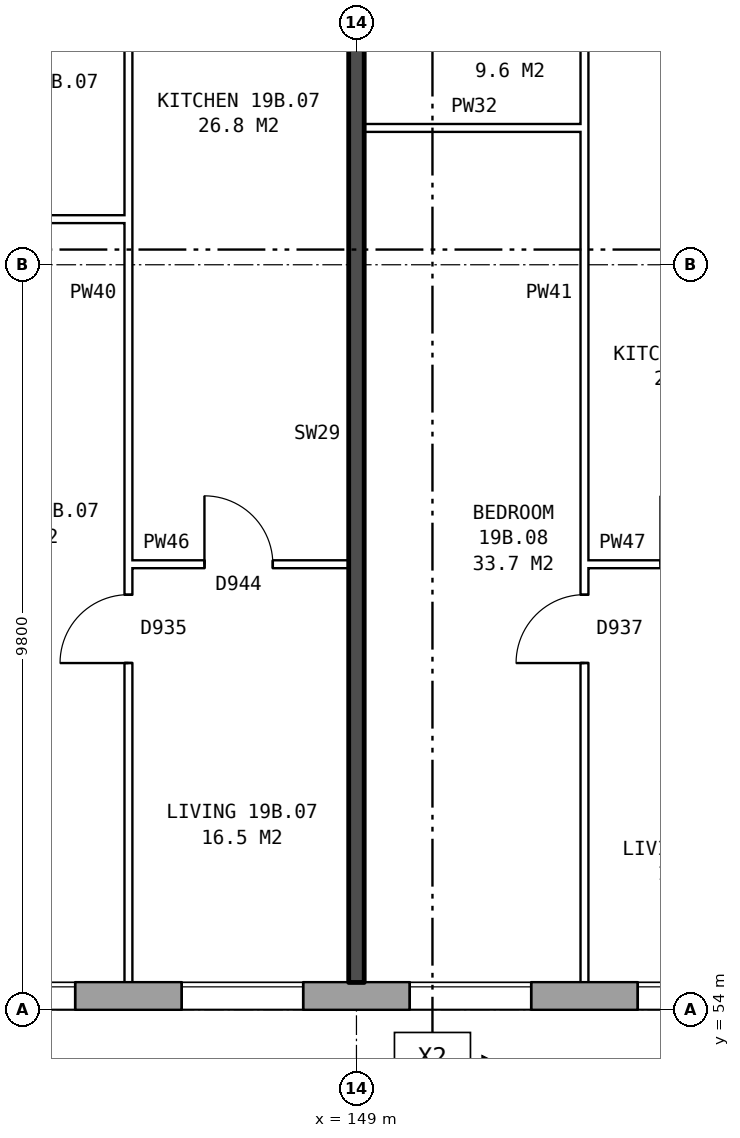
"""IFC4 building model, lengths in metres.
Left out: names, types, materials, properties, quantities, classifications, styles, units other than length and angle.
Written with IfcOpenShell. Run it as: python <this file> out.ifc"""

import sys

from ifc_helpers import new_model, si_unit, direction, frame, frame_2d, origin, place, context, subcontext, project, spatial, rectangle, extrude, element, fill, save


model = new_model("IFC4")
c1 = context("Model", 3, precision=1e-05, world=origin(), true_north=direction((0.0, 1.0)))
c2 = subcontext(c1, "Body", "Model", "MODEL_VIEW")
j1 = project(units=[si_unit("LENGTHUNIT", "METRE"), si_unit("PLANEANGLEUNIT", "RADIAN")], contexts=[c1])
p1 = place(None, origin())
s1 = spatial("IfcSite", under=j1, at=p1, CompositionType="ELEMENT")
p2 = place(p1, origin())
s2 = spatial("IfcBuilding", under=s1, at=p2, CompositionType="ELEMENT")
p3 = place(p2, frame((0.0, 0.0, 71.6)))
s3 = spatial("IfcBuildingStorey", under=s2, at=p3, CompositionType="ELEMENT", Elevation=71.6)
p4 = place(p3, frame((134.075, 54.18, 0.0), z_axis=(0.0, 0.0, 1.0), x_axis=(1.0, 0.0, 0.0)))
e1 = element("IfcWall", 1, at=p4, inside=s3, PredefinedType="STANDARD", context=c2, shape_type="SweptSolid", body=[
    extrude(rectangle(XDim=38.101, YDim=0.36, at=frame_2d((19.05, 0.0))), origin(), (0.0, 0.0, 1.0), 2.85),
])
p5 = place(p4, frame((0.3, 0.0, 0.8)))
e2 = element("IfcOpeningElement", 2, at=p5, cuts=e1, PredefinedType="OPENING", context=c2, shape_type="SweptSolid", body=[
    extrude(rectangle(XDim=1.0, YDim=1.8, at=frame_2d((0.5, 0.9))), frame((0.0, 0.19, 0.0), z_axis=(0.0, -1.0, 0.0), x_axis=(1.0, 0.0, 0.0)), (0.0, 0.0, 1.0), 0.38),
])
p6 = place(p4, frame((3.525, 0.0, 0.8)))
e3 = element("IfcOpeningElement", 3, at=p6, cuts=e1, PredefinedType="OPENING", context=c2, shape_type="SweptSolid", body=[
    extrude(rectangle(XDim=0.8, YDim=0.9, at=frame_2d((0.4, 0.45))), frame((0.0, 0.19, 0.0), z_axis=(0.0, -1.0, 0.0), x_axis=(1.0, 0.0, 0.0)), (0.0, 0.0, 1.0), 0.38),
])
p7 = place(p4, frame((6.625, 0.0, 0.8)))
e4 = element("IfcOpeningElement", 4, at=p7, cuts=e1, PredefinedType="OPENING", context=c2, shape_type="SweptSolid", body=[
    extrude(rectangle(XDim=1.6, YDim=1.8, at=frame_2d((0.8, 0.9))), frame((0.0, 0.19, 0.0), z_axis=(0.0, -1.0, 0.0), x_axis=(1.0, 0.0, 0.0)), (0.0, 0.0, 1.0), 0.38),
])
p8 = place(p4, frame((9.625, 0.0, 0.8)))
e5 = element("IfcOpeningElement", 5, at=p8, cuts=e1, PredefinedType="OPENING", context=c2, shape_type="SweptSolid", body=[
    extrude(rectangle(XDim=1.6, YDim=1.8, at=frame_2d((0.8, 0.9))), frame((0.0, 0.19, 0.0), z_axis=(0.0, -1.0, 0.0), x_axis=(1.0, 0.0, 0.0)), (0.0, 0.0, 1.0), 0.38),
])
p9 = place(p4, frame((12.625, 0.0, 0.8)))
e6 = element("IfcOpeningElement", 6, at=p9, cuts=e1, PredefinedType="OPENING", context=c2, shape_type="SweptSolid", body=[
    extrude(rectangle(XDim=1.6, YDim=1.8, at=frame_2d((0.8, 0.9))), frame((0.0, 0.19, 0.0), z_axis=(0.0, -1.0, 0.0), x_axis=(1.0, 0.0, 0.0)), (0.0, 0.0, 1.0), 0.38),
])
p10 = place(p4, frame((15.625, 0.0, 0.8)))
e7 = element("IfcOpeningElement", 7, at=p10, cuts=e1, PredefinedType="OPENING", context=c2, shape_type="SweptSolid", body=[
    extrude(rectangle(XDim=1.6, YDim=1.8, at=frame_2d((0.8, 0.9))), frame((0.0, 0.19, 0.0), z_axis=(0.0, -1.0, 0.0), x_axis=(1.0, 0.0, 0.0)), (0.0, 0.0, 1.0), 0.38),
])
p11 = place(p4, frame((18.625, 0.0, 0.8)))
e8 = element("IfcOpeningElement", 8, at=p11, cuts=e1, PredefinedType="OPENING", context=c2, shape_type="SweptSolid", body=[
    extrude(rectangle(XDim=1.6, YDim=1.8, at=frame_2d((0.8, 0.9))), frame((0.0, 0.19, 0.0), z_axis=(0.0, -1.0, 0.0), x_axis=(1.0, 0.0, 0.0)), (0.0, 0.0, 1.0), 0.38),
])
p12 = place(p4, frame((21.625, 0.0, 0.8)))
e9 = element("IfcOpeningElement", 9, at=p12, cuts=e1, PredefinedType="OPENING", context=c2, shape_type="SweptSolid", body=[
    extrude(rectangle(XDim=1.6, YDim=1.8, at=frame_2d((0.8, 0.9))), frame((0.0, 0.19, 0.0), z_axis=(0.0, -1.0, 0.0), x_axis=(1.0, 0.0, 0.0)), (0.0, 0.0, 1.0), 0.38),
])
p13 = place(p4, frame((24.625, 0.0, 0.8)))
e10 = element("IfcOpeningElement", 10, at=p13, cuts=e1, PredefinedType="OPENING", context=c2, shape_type="SweptSolid", body=[
    extrude(rectangle(XDim=1.6, YDim=1.8, at=frame_2d((0.8, 0.9))), frame((0.0, 0.19, 0.0), z_axis=(0.0, -1.0, 0.0), x_axis=(1.0, 0.0, 0.0)), (0.0, 0.0, 1.0), 0.38),
])
p14 = place(p4, frame((27.625, 0.0, 0.8)))
e11 = element("IfcOpeningElement", 11, at=p14, cuts=e1, PredefinedType="OPENING", context=c2, shape_type="SweptSolid", body=[
    extrude(rectangle(XDim=1.6, YDim=1.8, at=frame_2d((0.8, 0.9))), frame((0.0, 0.19, 0.0), z_axis=(0.0, -1.0, 0.0), x_axis=(1.0, 0.0, 0.0)), (0.0, 0.0, 1.0), 0.38),
])
p15 = place(p4, frame((30.625, 0.0, 0.8)))
e12 = element("IfcOpeningElement", 12, at=p15, cuts=e1, PredefinedType="OPENING", context=c2, shape_type="SweptSolid", body=[
    extrude(rectangle(XDim=1.6, YDim=1.8, at=frame_2d((0.8, 0.9))), frame((0.0, 0.19, 0.0), z_axis=(0.0, -1.0, 0.0), x_axis=(1.0, 0.0, 0.0)), (0.0, 0.0, 1.0), 0.38),
])
p16 = place(p4, frame((33.125, 0.0, 0.8)))
e13 = element("IfcOpeningElement", 13, at=p16, cuts=e1, PredefinedType="OPENING", context=c2, shape_type="SweptSolid", body=[
    extrude(rectangle(XDim=1.4, YDim=0.9, at=frame_2d((0.7, 0.45))), frame((0.0, 0.19, 0.0), z_axis=(0.0, -1.0, 0.0), x_axis=(1.0, 0.0, 0.0)), (0.0, 0.0, 1.0), 0.38),
])
p17 = place(p4, frame((1.6, 0.0, 1.6)))
e14 = element("IfcOpeningElement", 14, at=p17, cuts=e1, PredefinedType="OPENING", context=c2, shape_type="SweptSolid", body=[
    extrude(rectangle(XDim=0.6, YDim=0.9, at=frame_2d((0.3, 0.45))), frame((0.0, 0.19, 0.0), z_axis=(0.0, -1.0, 0.0), x_axis=(1.0, 0.0, 0.0)), (0.0, 0.0, 1.0), 0.38),
])
p18 = place(p4, frame((4.625, 0.0, 0.8)))
e15 = element("IfcOpeningElement", 15, at=p18, cuts=e1, PredefinedType="OPENING", context=c2, shape_type="SweptSolid", body=[
    extrude(rectangle(XDim=1.6, YDim=1.8, at=frame_2d((0.8, 0.9))), frame((0.0, 0.19, 0.0), z_axis=(0.0, -1.0, 0.0), x_axis=(1.0, 0.0, 0.0)), (0.0, 0.0, 1.0), 0.38),
])
p19 = place(p4, frame((35.775, 0.0, 1.7)))
e16 = element("IfcOpeningElement", 16, at=p19, cuts=e1, PredefinedType="OPENING", context=c2, shape_type="SweptSolid", body=[
    extrude(rectangle(XDim=0.6, YDim=0.9, at=frame_2d((0.3, 0.45))), frame((0.0, 0.19, 0.0), z_axis=(0.0, -1.0, 0.0), x_axis=(1.0, 0.0, 0.0)), (0.0, 0.0, 1.0), 0.38),
])
p20 = place(p4, frame((36.675, 0.0, 0.8)))
e17 = element("IfcOpeningElement", 17, at=p20, cuts=e1, PredefinedType="OPENING", context=c2, shape_type="SweptSolid", body=[
    extrude(rectangle(XDim=1.0, YDim=1.8, at=frame_2d((0.5, 0.9))), frame((0.0, 0.19, 0.0), z_axis=(0.0, -1.0, 0.0), x_axis=(1.0, 0.0, 0.0)), (0.0, 0.0, 1.0), 0.38),
])
p21 = place(p3, frame((146.0, 59.86, 0.0), z_axis=(0.0, 0.0, 1.0), x_axis=(1.0, 0.0, 0.0)))
e18 = element("IfcWall", 18, at=p21, inside=s3, PredefinedType="PARTITIONING", context=c2, shape_type="SweptSolid", body=[
    extrude(rectangle(XDim=2.9, YDim=0.1, at=frame_2d((1.45, 0.0))), origin(), (0.0, 0.0, 1.0), 2.85),
])
p22 = place(p21, frame((1.0, 0.0, 0.0)))
e19 = element("IfcOpeningElement", 19, at=p22, cuts=e18, PredefinedType="OPENING", context=c2, shape_type="SweptSolid", body=[
    extrude(rectangle(XDim=0.9, YDim=2.1, at=frame_2d((0.45, 1.05))), frame((0.0, 0.06, 0.0), z_axis=(0.0, -1.0, 0.0), x_axis=(1.0, 0.0, 0.0)), (0.0, 0.0, 1.0), 0.12),
])
p23 = place(p3, frame((152.0, 59.86, 0.0), z_axis=(0.0, 0.0, 1.0), x_axis=(1.0, 0.0, 0.0)))
e20 = element("IfcWall", 20, at=p23, inside=s3, PredefinedType="PARTITIONING", context=c2, shape_type="SweptSolid", body=[
    extrude(rectangle(XDim=2.9, YDim=0.1, at=frame_2d((1.45, 0.0))), origin(), (0.0, 0.0, 1.0), 2.85),
])
p24 = place(p23, frame((1.0, 0.0, 0.0)))
e21 = element("IfcOpeningElement", 21, at=p24, cuts=e20, PredefinedType="OPENING", context=c2, shape_type="SweptSolid", body=[
    extrude(rectangle(XDim=0.9, YDim=2.1, at=frame_2d((0.45, 1.05))), frame((0.0, 0.06, 0.0), z_axis=(0.0, -1.0, 0.0), x_axis=(1.0, 0.0, 0.0)), (0.0, 0.0, 1.0), 0.12),
])
p25 = place(p3, frame((142.76, 64.4, 0.0), z_axis=(0.0, 0.0, 1.0), x_axis=(1.0, 0.0, 0.0)))
e22 = element("IfcWall", 22, at=p25, inside=s3, PredefinedType="PARTITIONING", context=c2, shape_type="SweptSolid", body=[
    extrude(rectangle(XDim=3.24, YDim=0.1, at=frame_2d((1.62, 0.0))), origin(), (0.0, 0.0, 1.0), 2.85),
])
p26 = place(p3, frame((149.1, 65.6, 0.0), z_axis=(0.0, 0.0, 1.0), x_axis=(1.0, 0.0, 0.0)))
e23 = element("IfcWall", 23, at=p26, inside=s3, PredefinedType="PARTITIONING", context=c2, shape_type="SweptSolid", body=[
    extrude(rectangle(XDim=2.9, YDim=0.1, at=frame_2d((1.45, 0.0))), origin(), (0.0, 0.0, 1.0), 2.85),
])
p27 = place(p3, frame((146.0, 54.36, 0.0), z_axis=(0.0, 0.0, 1.0), x_axis=(0.0, 1.0, 0.0)))
e24 = element("IfcWall", 24, at=p27, inside=s3, PredefinedType="PARTITIONING", context=c2, shape_type="SweptSolid", body=[
    extrude(rectangle(XDim=14.34, YDim=0.1, at=frame_2d((7.17, 0.0))), origin(), (0.0, 0.0, 1.0), 2.85),
])
p28 = place(p27, frame((4.2, 0.0, 0.0)))
e25 = element("IfcOpeningElement", 25, at=p28, cuts=e24, PredefinedType="OPENING", context=c2, shape_type="SweptSolid", body=[
    extrude(rectangle(XDim=0.9, YDim=2.1, at=frame_2d((0.45, 1.05))), frame((0.0, 0.06, 0.0), z_axis=(0.0, -1.0, 0.0), x_axis=(1.0, 0.0, 0.0)), (0.0, 0.0, 1.0), 0.12),
])
p29 = place(p27, frame((13.04, 0.0, 0.0)))
e26 = element("IfcOpeningElement", 26, at=p29, cuts=e24, PredefinedType="OPENING", context=c2, shape_type="SweptSolid", body=[
    extrude(rectangle(XDim=0.9, YDim=2.1, at=frame_2d((0.45, 1.05))), frame((0.0, 0.06, 0.0), z_axis=(0.0, -1.0, 0.0), x_axis=(1.0, 0.0, 0.0)), (0.0, 0.0, 1.0), 0.12),
])
p30 = place(p3, frame((149.0, 54.36, 0.0), z_axis=(0.0, 0.0, 1.0), x_axis=(0.0, 1.0, 0.0)))
e27 = element("IfcWall", 27, at=p30, inside=s3, PredefinedType="SOLIDWALL", context=c2, shape_type="SweptSolid", body=[
    extrude(rectangle(XDim=14.44, YDim=0.2, at=frame_2d((7.22, 0.0))), origin(), (0.0, 0.0, 1.0), 2.85),
])
p31 = place(p3, frame((152.0, 54.36, 0.0), z_axis=(0.0, 0.0, 1.0), x_axis=(0.0, 1.0, 0.0)))
e28 = element("IfcWall", 28, at=p31, inside=s3, PredefinedType="PARTITIONING", context=c2, shape_type="SweptSolid", body=[
    extrude(rectangle(XDim=14.34, YDim=0.1, at=frame_2d((7.17, 0.0))), origin(), (0.0, 0.0, 1.0), 2.85),
])
p32 = place(p31, frame((4.2, 0.0, 0.0)))
e29 = element("IfcOpeningElement", 29, at=p32, cuts=e28, PredefinedType="OPENING", context=c2, shape_type="SweptSolid", body=[
    extrude(rectangle(XDim=0.9, YDim=2.1, at=frame_2d((0.45, 1.05))), frame((0.0, 0.06, 0.0), z_axis=(0.0, -1.0, 0.0), x_axis=(1.0, 0.0, 0.0)), (0.0, 0.0, 1.0), 0.12),
])
p33 = place(p31, frame((13.04, 0.0, 0.0)))
e30 = element("IfcOpeningElement", 30, at=p33, cuts=e28, PredefinedType="OPENING", context=c2, shape_type="SweptSolid", body=[
    extrude(rectangle(XDim=0.9, YDim=2.1, at=frame_2d((0.45, 1.05))), frame((0.0, 0.06, 0.0), z_axis=(0.0, -1.0, 0.0), x_axis=(1.0, 0.0, 0.0)), (0.0, 0.0, 1.0), 0.12),
])
p34 = place(p8, origin())
e31 = element("IfcWindow", 31, at=p34, inside=s3, PartitioningType="SINGLE_PANEL", PredefinedType="WINDOW", context=c2, shape_type="SweptSolid", body=[
    extrude(rectangle(XDim=1.6, YDim=1.8, at=frame_2d((0.8, 0.9))), frame((0.0, 0.15, 0.0), z_axis=(0.0, -1.0, 0.0), x_axis=(1.0, 0.0, 0.0)), (0.0, 0.0, 1.0), 0.06),
])
fill(e5, e31)
p35 = place(p9, origin())
e32 = element("IfcWindow", 32, at=p35, inside=s3, PartitioningType="SINGLE_PANEL", PredefinedType="WINDOW", context=c2, shape_type="SweptSolid", body=[
    extrude(rectangle(XDim=1.6, YDim=1.8, at=frame_2d((0.8, 0.9))), frame((0.0, 0.15, 0.0), z_axis=(0.0, -1.0, 0.0), x_axis=(1.0, 0.0, 0.0)), (0.0, 0.0, 1.0), 0.06),
])
fill(e6, e32)
p36 = place(p10, origin())
e33 = element("IfcWindow", 33, at=p36, inside=s3, PartitioningType="SINGLE_PANEL", PredefinedType="WINDOW", context=c2, shape_type="SweptSolid", body=[
    extrude(rectangle(XDim=1.6, YDim=1.8, at=frame_2d((0.8, 0.9))), frame((0.0, 0.15, 0.0), z_axis=(0.0, -1.0, 0.0), x_axis=(1.0, 0.0, 0.0)), (0.0, 0.0, 1.0), 0.06),
])
fill(e7, e33)
p37 = place(p11, origin())
e34 = element("IfcWindow", 34, at=p37, inside=s3, PartitioningType="SINGLE_PANEL", PredefinedType="WINDOW", context=c2, shape_type="SweptSolid", body=[
    extrude(rectangle(XDim=1.6, YDim=1.8, at=frame_2d((0.8, 0.9))), frame((0.0, 0.15, 0.0), z_axis=(0.0, -1.0, 0.0), x_axis=(1.0, 0.0, 0.0)), (0.0, 0.0, 1.0), 0.06),
])
fill(e8, e34)
p38 = place(p28, origin())
e35 = element("IfcDoor", 35, at=p38, inside=s3, OperationType="SINGLE_SWING_LEFT", PredefinedType="DOOR", context=c2, shape_type="SweptSolid", body=[
    extrude(rectangle(XDim=0.9, YDim=2.1, at=frame_2d((0.45, 1.05))), frame((0.0, 0.025, 0.0), z_axis=(0.0, -1.0, 0.0), x_axis=(1.0, 0.0, 0.0)), (0.0, 0.0, 1.0), 0.05),
])
fill(e25, e35)
p39 = place(p22, origin())
e36 = element("IfcDoor", 36, at=p39, inside=s3, OperationType="SINGLE_SWING_LEFT", PredefinedType="DOOR", context=c2, shape_type="SweptSolid", body=[
    extrude(rectangle(XDim=0.9, YDim=2.1, at=frame_2d((0.45, 1.05))), frame((0.0, 0.025, 0.0), z_axis=(0.0, -1.0, 0.0), x_axis=(1.0, 0.0, 0.0)), (0.0, 0.0, 1.0), 0.05),
])
fill(e19, e36)
p40 = place(p32, origin())
e37 = element("IfcDoor", 37, at=p40, inside=s3, OperationType="SINGLE_SWING_LEFT", PredefinedType="DOOR", context=c2, shape_type="SweptSolid", body=[
    extrude(rectangle(XDim=0.9, YDim=2.1, at=frame_2d((0.45, 1.05))), frame((0.0, 0.025, 0.0), z_axis=(0.0, -1.0, 0.0), x_axis=(1.0, 0.0, 0.0)), (0.0, 0.0, 1.0), 0.05),
])
fill(e29, e37)
save(model, sys.argv[1])
